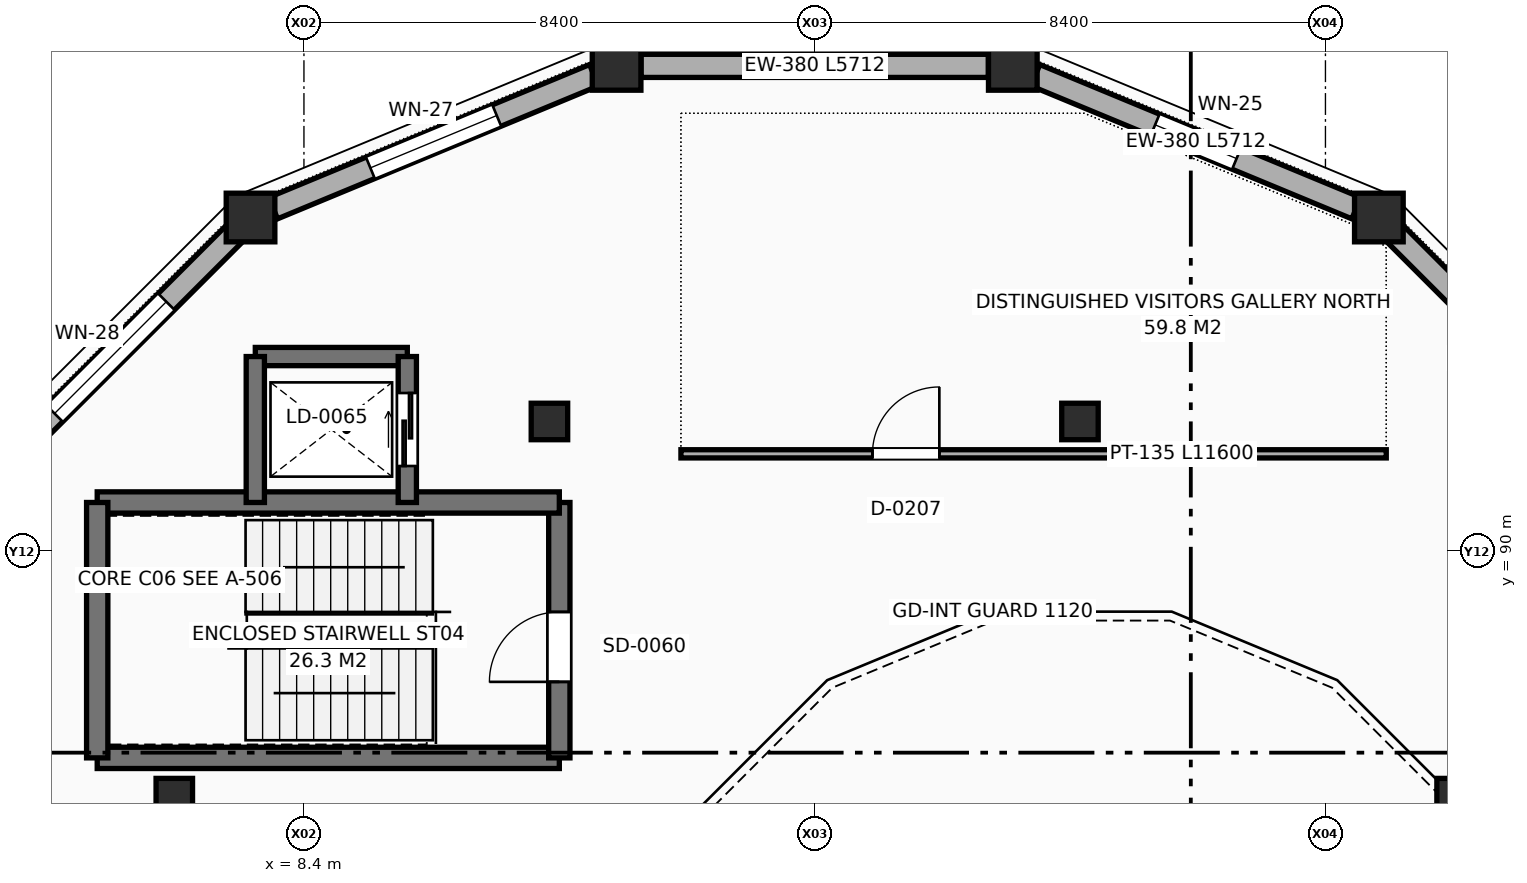
"""IFC4 building model, lengths in metres.
Left out: names, types, materials, properties, quantities, classifications, styles, units other than length and angle.
Written with IfcOpenShell. Run it as: python <this file> out.ifc"""

import sys

from ifc_helpers import new_model, si_unit, direction, frame, frame_2d, origin, origin_2d, place, context, subcontext, project, spatial, rectangle, circle, extrude, element, fill, save


model = new_model("IFC4")
c1 = context("Model", 3, precision=1e-05, world=origin(), true_north=direction((0.0, 1.0)))
c2 = subcontext(c1, "Body", "Model", "MODEL_VIEW")
j1 = project(units=[si_unit("LENGTHUNIT", "METRE"), si_unit("PLANEANGLEUNIT", "RADIAN")], contexts=[c1])
p1 = place(None, origin())
s1 = spatial("IfcSite", under=j1, at=p1, CompositionType="ELEMENT")
p2 = place(p1, origin())
s2 = spatial("IfcBuilding", under=s1, at=p2, CompositionType="ELEMENT")
p3 = place(p2, frame((0.0, 0.0, 9.6)))
s3 = spatial("IfcBuildingStorey", under=s2, at=p3, CompositionType="ELEMENT", Elevation=9.6)
for number, where, z_axis, x_axis in (
    (1, (26.079, 95.486, 0.0), (0.0, 0.0, 1.0), (1.0, 0.0, 0.0)),
    (2, (20.058, 97.98, 0.0), (0.0, 0.0, 1.0), (1.0, 0.0, 0.0)),
    (3, (13.542, 97.98, 0.0), (0.0, 0.0, 1.0), (1.0, 0.0, 0.0)),
    (4, (7.521, 95.486, 0.0), (0.0, 0.0, 1.0), (1.0, 0.0, 0.0)),
):
    element("IfcColumn", number, at=place(p3, frame(where, z_axis=z_axis, x_axis=x_axis)), inside=s3, PredefinedType="COLUMN", context=c2, shape_type="SweptSolid", body=[
        extrude(circle(Radius=0.4, at=origin_2d()), origin(), (0.0, 0.0, 1.0), 4.2),
    ])
for number, where, z_axis, x_axis in (
    (5, (27.332, 85.963, 0.0), (0.0, 0.0, 1.0), (1.0, 0.0, 0.0)),
    (6, (21.163, 92.132, 0.0), (0.0, 0.0, 1.0), (1.0, 0.0, 0.0)),
    (7, (12.438, 92.132, 0.0), (0.0, 0.0, 1.0), (1.0, 0.0, 0.0)),
    (8, (6.268, 85.963, 0.0), (0.0, 0.0, 1.0), (1.0, 0.0, 0.0)),
):
    element("IfcColumn", number, at=place(p3, frame(where, z_axis=z_axis, x_axis=x_axis)), inside=s3, PredefinedType="COLUMN", context=c2, shape_type="SweptSolid", body=[
        extrude(circle(Radius=0.3, at=origin_2d()), origin(), (0.0, 0.0, 1.0), 4.2),
    ])
p4 = place(p3, frame((30.402, 91.163, 0.0), z_axis=(0.0, 0.0, 1.0), x_axis=(-0.707128150708, 0.707085411019, 0.0)))
e9 = element("IfcWall", 9, at=p4, inside=s3, PredefinedType="SOLIDWALL", context=c2, shape_type="SweptSolid", body=[
    extrude(rectangle(XDim=5.712, YDim=0.38, at=frame_2d((2.856, 0.0))), origin(), (0.0, 0.0, 1.0), 3.13),
])
p5 = place(p4, frame((2.306, 0.0, 0.9)))
e10 = element("IfcOpeningElement", 10, at=p5, cuts=e9, PredefinedType="OPENING", context=c2, shape_type="SweptSolid", body=[
    extrude(rectangle(XDim=1.1, YDim=1.8, at=frame_2d((0.55, 0.9))), frame((0.0, 0.2, 0.0), z_axis=(0.0, -1.0, 0.0), x_axis=(1.0, 0.0, 0.0)), (0.0, 0.0, 1.0), 0.4),
])
p6 = place(p3, frame((25.707, 95.64, 0.0), z_axis=(0.0, 0.0, 1.0), x_axis=(-0.923874097972, 0.382696552241, 0.0)))
e11 = element("IfcWall", 11, at=p6, inside=s3, PredefinedType="SOLIDWALL", context=c2, shape_type="SweptSolid", body=[
    extrude(rectangle(XDim=5.712, YDim=0.38, at=frame_2d((2.856, 0.0))), origin(), (0.0, 0.0, 1.0), 3.13),
])
p7 = place(p6, frame((2.131, 0.0, 0.9)))
e12 = element("IfcOpeningElement", 12, at=p7, cuts=e11, PredefinedType="OPENING", context=c2, shape_type="SweptSolid", body=[
    extrude(rectangle(XDim=1.45, YDim=1.5, at=frame_2d((0.725, 0.75))), frame((0.0, 0.2, 0.0), z_axis=(0.0, -1.0, 0.0), x_axis=(1.0, 0.0, 0.0)), (0.0, 0.0, 1.0), 0.4),
])
p8 = place(p3, frame((19.656, 97.98, 0.0), z_axis=(0.0, 0.0, 1.0), x_axis=(-1.0, 0.0, 0.0)))
e13 = element("IfcWall", 13, at=p8, inside=s3, PredefinedType="SOLIDWALL", context=c2, shape_type="SweptSolid", body=[
    extrude(rectangle(XDim=5.712, YDim=0.38, at=frame_2d((2.856, 0.0))), origin(), (0.0, 0.0, 1.0), 3.13),
])
p9 = place(p8, frame((1.931, 0.0, 0.9)))
e14 = element("IfcOpeningElement", 14, at=p9, cuts=e13, PredefinedType="OPENING", context=c2, shape_type="SweptSolid", body=[
    extrude(rectangle(XDim=1.85, YDim=1.5, at=frame_2d((0.925, 0.75))), frame((0.0, 0.2, 0.0), z_axis=(0.0, -1.0, 0.0), x_axis=(1.0, 0.0, 0.0)), (0.0, 0.0, 1.0), 0.4),
])
p10 = place(p3, frame((13.17, 97.826, 0.0), z_axis=(0.0, 0.0, 1.0), x_axis=(-0.923880357201, -0.382681441383, 0.0)))
e15 = element("IfcWall", 15, at=p10, inside=s3, PredefinedType="SOLIDWALL", context=c2, shape_type="SweptSolid", body=[
    extrude(rectangle(XDim=5.712, YDim=0.38, at=frame_2d((2.856, 0.0))), origin(), (0.0, 0.0, 1.0), 3.13),
])
p11 = place(p10, frame((1.731, 0.0, 0.9)))
e16 = element("IfcOpeningElement", 16, at=p11, cuts=e15, PredefinedType="OPENING", context=c2, shape_type="SweptSolid", body=[
    extrude(rectangle(XDim=2.25, YDim=1.5, at=frame_2d((1.125, 0.75))), frame((0.0, 0.2, 0.0), z_axis=(0.0, -1.0, 0.0), x_axis=(1.0, 0.0, 0.0)), (0.0, 0.0, 1.0), 0.4),
])
p12 = place(p3, frame((7.237, 95.202, 0.0), z_axis=(0.0, 0.0, 1.0), x_axis=(-0.707128150708, -0.707085411019, 0.0)))
e17 = element("IfcWall", 17, at=p12, inside=s3, PredefinedType="SOLIDWALL", context=c2, shape_type="SweptSolid", body=[
    extrude(rectangle(XDim=5.712, YDim=0.38, at=frame_2d((2.856, 0.0))), origin(), (0.0, 0.0, 1.0), 3.13),
])
p13 = place(p12, frame((1.556, 0.0, 0.9)))
e18 = element("IfcOpeningElement", 18, at=p13, cuts=e17, PredefinedType="OPENING", context=c2, shape_type="SweptSolid", body=[
    extrude(rectangle(XDim=2.6, YDim=1.6, at=frame_2d((1.3, 0.8))), frame((0.0, 0.2, 0.0), z_axis=(0.0, -1.0, 0.0), x_axis=(1.0, 0.0, 0.0)), (0.0, 0.0, 1.0), 0.4),
])
p14 = place(p3, frame((5.0, 86.6, 0.0), z_axis=(0.0, 0.0, 1.0), x_axis=(1.0, 0.0, 0.0)))
e19 = element("IfcWall", 19, at=p14, inside=s3, PredefinedType="SHEAR", context=c2, shape_type="SweptSolid", body=[
    extrude(rectangle(XDim=7.6, YDim=0.35, at=frame_2d((3.8, 0.0))), origin(), (0.0, 0.0, 1.0), 3.92),
])
p15 = place(p3, frame((12.6, 86.6, 0.0), z_axis=(0.0, 0.0, 1.0), x_axis=(0.0, 1.0, 0.0)))
e20 = element("IfcWall", 20, at=p15, inside=s3, PredefinedType="SHEAR", context=c2, shape_type="SweptSolid", body=[
    extrude(rectangle(XDim=4.2, YDim=0.35, at=frame_2d((2.1, 0.0))), origin(), (0.0, 0.0, 1.0), 3.92),
])
p16 = place(p15, frame((1.25, 0.0, 0.0)))
e21 = element("IfcOpeningElement", 21, at=p16, cuts=e20, PredefinedType="OPENING", context=c2, shape_type="SweptSolid", body=[
    extrude(rectangle(XDim=1.15, YDim=2.2, at=frame_2d((0.575, 1.1))), frame((0.0, 0.185, 0.0), z_axis=(0.0, -1.0, 0.0), x_axis=(1.0, 0.0, 0.0)), (0.0, 0.0, 1.0), 0.37),
])
p17 = place(p3, frame((12.6, 90.8, 0.0), z_axis=(0.0, 0.0, 1.0), x_axis=(-1.0, 0.0, 0.0)))
e22 = element("IfcWall", 22, at=p17, inside=s3, PredefinedType="SHEAR", context=c2, shape_type="SweptSolid", body=[
    extrude(rectangle(XDim=7.6, YDim=0.35, at=frame_2d((3.8, 0.0))), origin(), (0.0, 0.0, 1.0), 3.92),
])
p18 = place(p3, frame((5.0, 90.8, 0.0), z_axis=(0.0, 0.0, 1.0), x_axis=(0.0, -1.0, 0.0)))
e23 = element("IfcWall", 23, at=p18, inside=s3, PredefinedType="SHEAR", context=c2, shape_type="SweptSolid", body=[
    extrude(rectangle(XDim=4.2, YDim=0.35, at=frame_2d((2.1, 0.0))), origin(), (0.0, 0.0, 1.0), 3.92),
])
p19 = place(p3, frame((10.1, 93.2, 0.0), z_axis=(0.0, 0.0, 1.0), x_axis=(-1.0, 0.0, 0.0)))
e24 = element("IfcWall", 24, at=p19, inside=s3, PredefinedType="SHEAR", context=c2, shape_type="SweptSolid", body=[
    extrude(rectangle(XDim=2.5, YDim=0.3, at=frame_2d((1.25, 0.0))), origin(), (0.0, 0.0, 1.0), 3.92),
])
p20 = place(p3, frame((7.6, 93.2, 0.0), z_axis=(0.0, 0.0, 1.0), x_axis=(0.0, -1.0, 0.0)))
e25 = element("IfcWall", 25, at=p20, inside=s3, PredefinedType="SHEAR", context=c2, shape_type="SweptSolid", body=[
    extrude(rectangle(XDim=2.4, YDim=0.3, at=frame_2d((1.2, 0.0))), origin(), (0.0, 0.0, 1.0), 3.92),
])
p21 = place(p3, frame((10.1, 90.8, 0.0), z_axis=(0.0, 0.0, 1.0), x_axis=(0.0, 1.0, 0.0)))
e26 = element("IfcWall", 26, at=p21, inside=s3, PredefinedType="SHEAR", context=c2, shape_type="SweptSolid", body=[
    extrude(rectangle(XDim=2.4, YDim=0.3, at=frame_2d((1.2, 0.0))), origin(), (0.0, 0.0, 1.0), 3.92),
])
p22 = place(p21, frame((0.6, 0.0, 0.0)))
e27 = element("IfcOpeningElement", 27, at=p22, cuts=e26, PredefinedType="OPENING", context=c2, shape_type="SweptSolid", body=[
    extrude(rectangle(XDim=1.2, YDim=2.25, at=frame_2d((0.6, 1.125))), frame((0.0, 0.16, 0.0), z_axis=(0.0, -1.0, 0.0), x_axis=(1.0, 0.0, 0.0)), (0.0, 0.0, 1.0), 0.32),
])
p23 = place(p3, frame((14.6, 91.6, 0.0), z_axis=(0.0, 0.0, 1.0), x_axis=(1.0, 0.0, 0.0)))
e28 = element("IfcWall", 28, at=p23, inside=s3, PredefinedType="PARTITIONING", context=c2, shape_type="SweptSolid", body=[
    extrude(rectangle(XDim=11.6, YDim=0.135, at=frame_2d((5.8, 0.0))), origin(), (0.0, 0.0, 1.0), 3.86),
])
p24 = place(p23, frame((3.15, 0.0, 0.0)))
e29 = element("IfcOpeningElement", 29, at=p24, cuts=e28, PredefinedType="OPENING", context=c2, shape_type="SweptSolid", body=[
    extrude(rectangle(XDim=1.1, YDim=2.15, at=frame_2d((0.55, 1.075))), frame((0.0, 0.077, 0.0), z_axis=(0.0, -1.0, 0.0), x_axis=(1.0, 0.0, 0.0)), (0.0, 0.0, 1.0), 0.155),
])
p25 = place(p7, origin())
e30 = element("IfcWindow", 30, at=p25, inside=s3, PartitioningType="SINGLE_PANEL", PredefinedType="WINDOW", context=c2, shape_type="SweptSolid", body=[
    extrude(rectangle(XDim=1.45, YDim=1.5, at=frame_2d((0.725, 0.75))), frame((0.0, 0.03, 0.0), z_axis=(0.0, -1.0, 0.0), x_axis=(1.0, 0.0, 0.0)), (0.0, 0.0, 1.0), 0.06),
])
fill(e12, e30)
p26 = place(p9, origin())
e31 = element("IfcWindow", 31, at=p26, inside=s3, PartitioningType="SINGLE_PANEL", PredefinedType="WINDOW", context=c2, shape_type="SweptSolid", body=[
    extrude(rectangle(XDim=1.85, YDim=1.5, at=frame_2d((0.925, 0.75))), frame((0.0, 0.03, 0.0), z_axis=(0.0, -1.0, 0.0), x_axis=(1.0, 0.0, 0.0)), (0.0, 0.0, 1.0), 0.06),
])
fill(e14, e31)
p27 = place(p11, origin())
e32 = element("IfcWindow", 32, at=p27, inside=s3, PartitioningType="SINGLE_PANEL", PredefinedType="WINDOW", context=c2, shape_type="SweptSolid", body=[
    extrude(rectangle(XDim=2.25, YDim=1.5, at=frame_2d((1.125, 0.75))), frame((0.0, 0.03, 0.0), z_axis=(0.0, -1.0, 0.0), x_axis=(1.0, 0.0, 0.0)), (0.0, 0.0, 1.0), 0.06),
])
fill(e16, e32)
p28 = place(p13, origin())
e33 = element("IfcWindow", 33, at=p28, inside=s3, PartitioningType="SINGLE_PANEL", PredefinedType="WINDOW", context=c2, shape_type="SweptSolid", body=[
    extrude(rectangle(XDim=2.6, YDim=1.6, at=frame_2d((1.3, 0.8))), frame((0.0, 0.03, 0.0), z_axis=(0.0, -1.0, 0.0), x_axis=(1.0, 0.0, 0.0)), (0.0, 0.0, 1.0), 0.06),
])
fill(e18, e33)
p29 = place(p16, origin())
e34 = element("IfcDoor", 34, at=p29, inside=s3, OperationType="SINGLE_SWING_LEFT", PredefinedType="DOOR", context=c2, shape_type="SweptSolid", body=[
    extrude(rectangle(XDim=1.15, YDim=2.2, at=frame_2d((0.575, 1.1))), frame((0.0, 0.025, 0.0), z_axis=(0.0, -1.0, 0.0), x_axis=(1.0, 0.0, 0.0)), (0.0, 0.0, 1.0), 0.05),
])
fill(e21, e34)
p30 = place(p22, origin())
e35 = element("IfcDoor", 35, at=p30, inside=s3, OperationType="SLIDING_TO_LEFT", PredefinedType="DOOR", context=c2, shape_type="SweptSolid", body=[
    extrude(rectangle(XDim=1.2, YDim=2.25, at=frame_2d((0.6, 1.125))), frame((0.0, 0.025, 0.0), z_axis=(0.0, -1.0, 0.0), x_axis=(1.0, 0.0, 0.0)), (0.0, 0.0, 1.0), 0.05),
])
fill(e27, e35)
p31 = place(p24, origin())
e36 = element("IfcDoor", 36, at=p31, inside=s3, OperationType="SINGLE_SWING_RIGHT", PredefinedType="DOOR", context=c2, shape_type="SweptSolid", body=[
    extrude(rectangle(XDim=1.1, YDim=2.15, at=frame_2d((0.55, 1.075))), frame((0.0, 0.025, 0.0), z_axis=(0.0, -1.0, 0.0), x_axis=(1.0, 0.0, 0.0)), (0.0, 0.0, 1.0), 0.05),
])
fill(e29, e36)
save(model, sys.argv[1])
